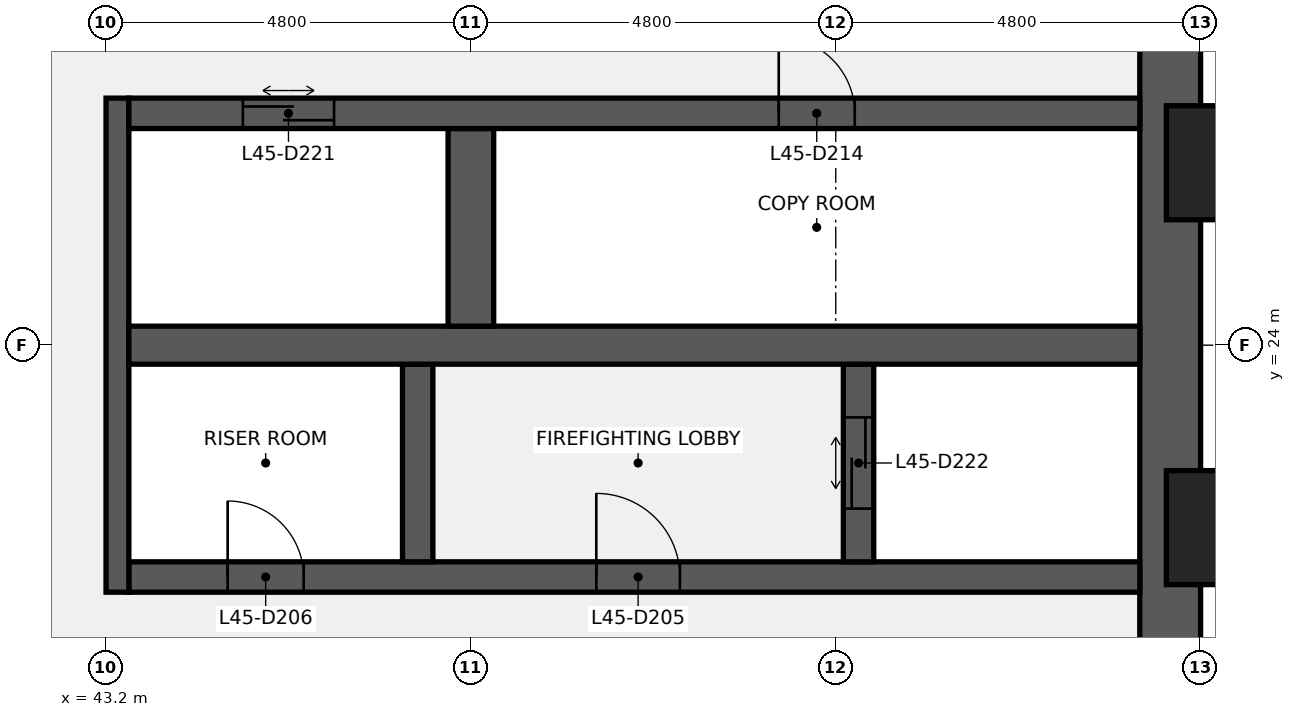
"""IFC4 building model, lengths in metres.
Left out: names, types, materials, properties, quantities, classifications, styles, units other than length and angle.
Written with IfcOpenShell. Run it as: python <this file> out.ifc"""

import sys

from ifc_helpers import new_model, si_unit, direction, frame, frame_2d, origin, origin_2d, place, context, subcontext, project, spatial, rectangle, extrude, element, fill, save


model = new_model("IFC4")
c1 = context("Model", 3, precision=1e-05, world=origin(), true_north=direction((0.0, 1.0)))
c2 = subcontext(c1, "Body", "Model", "MODEL_VIEW")
j1 = project(units=[si_unit("LENGTHUNIT", "METRE"), si_unit("PLANEANGLEUNIT", "RADIAN")], contexts=[c1])
p1 = place(None, origin())
s1 = spatial("IfcSite", under=j1, at=p1, CompositionType="ELEMENT")
p2 = place(p1, origin())
s2 = spatial("IfcBuilding", under=s1, at=p2, CompositionType="ELEMENT")
p3 = place(p2, frame((0.0, 0.0, 209.2)))
s3 = spatial("IfcBuildingStorey", under=s2, at=p3, CompositionType="ELEMENT", Elevation=209.2)
p4 = place(p3, frame((57.2, 38.4, 0.0), z_axis=(0.0, 0.0, 1.0), x_axis=(0.0, -1.0, 0.0)))
e1 = element("IfcWall", 1, at=p4, inside=s3, PredefinedType="SHEAR", context=c2, shape_type="SweptSolid", body=[
    extrude(rectangle(XDim=28.8, YDim=0.8, at=frame_2d((14.4, 0.0))), origin(), (0.0, 0.0, 1.0), 3.84),
])
p5 = place(p4, frame((18.45, 0.0, 0.9)))
e2 = element("IfcOpeningElement", 2, at=p5, cuts=e1, PredefinedType="OPENING", context=c2, shape_type="SweptSolid", body=[
    extrude(rectangle(XDim=1.5, YDim=1.5, at=frame_2d((0.75, 0.75))), frame((0.0, 0.41, 0.0), z_axis=(0.0, -1.0, 0.0), x_axis=(1.0, 0.0, 0.0)), (0.0, 0.0, 1.0), 0.82),
])
p6 = place(p4, frame((8.85, 0.0, 0.9)))
e3 = element("IfcOpeningElement", 3, at=p6, cuts=e1, PredefinedType="OPENING", context=c2, shape_type="SweptSolid", body=[
    extrude(rectangle(XDim=1.5, YDim=1.5, at=frame_2d((0.75, 0.75))), frame((0.0, 0.41, 0.0), z_axis=(0.0, -1.0, 0.0), x_axis=(1.0, 0.0, 0.0)), (0.0, 0.0, 1.0), 0.82),
])
p7 = place(p3, frame((43.5, 20.95, 0.0), z_axis=(0.0, 0.0, 1.0), x_axis=(1.0, 0.0, 0.0)))
e4 = element("IfcWall", 4, at=p7, inside=s3, PredefinedType="SHEAR", context=c2, shape_type="SweptSolid", body=[
    extrude(rectangle(XDim=13.3, YDim=0.4, at=frame_2d((6.65, 0.0))), origin(), (0.0, 0.0, 1.0), 3.84),
])
p8 = place(p7, frame((6.15, 0.0, 0.0)))
e5 = element("IfcOpeningElement", 5, at=p8, cuts=e4, PredefinedType="OPENING", context=c2, shape_type="SweptSolid", body=[
    extrude(rectangle(XDim=1.1, YDim=2.1, at=frame_2d((0.55, 1.05))), frame((0.0, 0.21, 0.0), z_axis=(0.0, -1.0, 0.0), x_axis=(1.0, 0.0, 0.0)), (0.0, 0.0, 1.0), 0.42),
])
p9 = place(p7, frame((1.3, 0.0, 0.0)))
e6 = element("IfcOpeningElement", 6, at=p9, cuts=e4, PredefinedType="OPENING", context=c2, shape_type="SweptSolid", body=[
    extrude(rectangle(XDim=1.0, YDim=2.1, at=frame_2d((0.5, 1.05))), frame((0.0, 0.21, 0.0), z_axis=(0.0, -1.0, 0.0), x_axis=(1.0, 0.0, 0.0)), (0.0, 0.0, 1.0), 0.42),
])
p10 = place(p3, frame((43.35, 20.75, 0.0), z_axis=(0.0, 0.0, 1.0), x_axis=(0.0, 1.0, 0.0)))
e7 = element("IfcWall", 7, at=p10, inside=s3, PredefinedType="SHEAR", context=c2, shape_type="SweptSolid", body=[
    extrude(rectangle(XDim=6.5, YDim=0.3, at=frame_2d((3.25, 0.0))), origin(), (0.0, 0.0, 1.0), 3.84),
])
p11 = place(p3, frame((53.1, 21.15, 0.0), z_axis=(0.0, 0.0, 1.0), x_axis=(0.0, 1.0, 0.0)))
e8 = element("IfcWall", 8, at=p11, inside=s3, PredefinedType="SHEAR", context=c2, shape_type="SweptSolid", body=[
    extrude(rectangle(XDim=2.6, YDim=0.4, at=frame_2d((1.3, 0.0))), origin(), (0.0, 0.0, 1.0), 3.84),
])
p12 = place(p11, frame((0.7, 0.0, 0.0)))
e9 = element("IfcOpeningElement", 9, at=p12, cuts=e8, PredefinedType="OPENING", context=c2, shape_type="SweptSolid", body=[
    extrude(rectangle(XDim=1.2, YDim=2.1, at=frame_2d((0.6, 1.05))), frame((0.0, 0.21, 0.0), z_axis=(0.0, -1.0, 0.0), x_axis=(1.0, 0.0, 0.0)), (0.0, 0.0, 1.0), 0.42),
])
p13 = place(p3, frame((47.3, 21.15, 0.0), z_axis=(0.0, 0.0, 1.0), x_axis=(0.0, 1.0, 0.0)))
e10 = element("IfcWall", 10, at=p13, inside=s3, PredefinedType="SHEAR", context=c2, shape_type="SweptSolid", body=[
    extrude(rectangle(XDim=2.6, YDim=0.4, at=frame_2d((1.3, 0.0))), origin(), (0.0, 0.0, 1.0), 3.84),
])
p14 = place(p3, frame((43.5, 24.0, 0.0), z_axis=(0.0, 0.0, 1.0), x_axis=(1.0, 0.0, 0.0)))
e11 = element("IfcWall", 11, at=p14, inside=s3, PredefinedType="SHEAR", context=c2, shape_type="SweptSolid", body=[
    extrude(rectangle(XDim=13.3, YDim=0.5, at=frame_2d((6.65, 0.0))), origin(), (0.0, 0.0, 1.0), 3.84),
])
p15 = place(p3, frame((48.0, 24.25, 0.0), z_axis=(0.0, 0.0, 1.0), x_axis=(0.0, 1.0, 0.0)))
e12 = element("IfcWall", 12, at=p15, inside=s3, PredefinedType="SHEAR", context=c2, shape_type="SweptSolid", body=[
    extrude(rectangle(XDim=2.6, YDim=0.6, at=frame_2d((1.3, 0.0))), origin(), (0.0, 0.0, 1.0), 3.84),
])
p16 = place(p3, frame((43.5, 27.05, 0.0), z_axis=(0.0, 0.0, 1.0), x_axis=(1.0, 0.0, 0.0)))
e13 = element("IfcWall", 13, at=p16, inside=s3, PredefinedType="SHEAR", context=c2, shape_type="SweptSolid", body=[
    extrude(rectangle(XDim=13.3, YDim=0.4, at=frame_2d((6.65, 0.0))), origin(), (0.0, 0.0, 1.0), 3.84),
])
p17 = place(p16, frame((8.55, 0.0, 0.0)))
e14 = element("IfcOpeningElement", 14, at=p17, cuts=e13, PredefinedType="OPENING", context=c2, shape_type="SweptSolid", body=[
    extrude(rectangle(XDim=1.0, YDim=2.1, at=frame_2d((0.5, 1.05))), frame((0.0, 0.21, 0.0), z_axis=(0.0, -1.0, 0.0), x_axis=(1.0, 0.0, 0.0)), (0.0, 0.0, 1.0), 0.42),
])
p18 = place(p16, frame((1.5, 0.0, 0.0)))
e15 = element("IfcOpeningElement", 15, at=p18, cuts=e13, PredefinedType="OPENING", context=c2, shape_type="SweptSolid", body=[
    extrude(rectangle(XDim=1.2, YDim=2.1, at=frame_2d((0.6, 1.05))), frame((0.0, 0.21, 0.0), z_axis=(0.0, -1.0, 0.0), x_axis=(1.0, 0.0, 0.0)), (0.0, 0.0, 1.0), 0.42),
])
for number, where, z_axis, x_axis in (
    (16, (58.35, 21.6, 0.0), (0.0, 0.0, 1.0), (0.0, 1.0, 0.0)),
    (17, (58.35, 26.4, 0.0), (0.0, 0.0, 1.0), (0.0, 1.0, 0.0)),
):
    element("IfcColumn", number, at=place(p3, frame(where, z_axis=z_axis, x_axis=x_axis)), inside=s3, PredefinedType="PILASTER", context=c2, shape_type="SweptSolid", body=[
        extrude(rectangle(XDim=2.4, YDim=1.5, at=origin_2d()), origin(), (0.0, 0.0, 1.0), 4.0),
    ])
p19 = place(p8, origin())
e18 = element("IfcDoor", 18, at=p19, inside=s3, OperationType="SINGLE_SWING_LEFT", PredefinedType="DOOR", context=c2, shape_type="SweptSolid", body=[
    extrude(rectangle(XDim=1.1, YDim=2.1, at=frame_2d((0.55, 1.05))), frame((0.0, 0.025, 0.0), z_axis=(0.0, -1.0, 0.0), x_axis=(1.0, 0.0, 0.0)), (0.0, 0.0, 1.0), 0.05),
])
fill(e5, e18)
p20 = place(p9, origin())
e19 = element("IfcDoor", 19, at=p20, inside=s3, OperationType="SINGLE_SWING_LEFT", PredefinedType="DOOR", context=c2, shape_type="SweptSolid", body=[
    extrude(rectangle(XDim=1.0, YDim=2.1, at=frame_2d((0.5, 1.05))), frame((0.0, 0.025, 0.0), z_axis=(0.0, -1.0, 0.0), x_axis=(1.0, 0.0, 0.0)), (0.0, 0.0, 1.0), 0.05),
])
fill(e6, e19)
p21 = place(p17, origin())
e20 = element("IfcDoor", 20, at=p21, inside=s3, OperationType="SINGLE_SWING_LEFT", PredefinedType="DOOR", context=c2, shape_type="SweptSolid", body=[
    extrude(rectangle(XDim=1.0, YDim=2.1, at=frame_2d((0.5, 1.05))), frame((0.0, 0.025, 0.0), z_axis=(0.0, -1.0, 0.0), x_axis=(1.0, 0.0, 0.0)), (0.0, 0.0, 1.0), 0.05),
])
fill(e14, e20)
p22 = place(p18, origin())
e21 = element("IfcDoor", 21, at=p22, inside=s3, OperationType="DOUBLE_DOOR_SLIDING", PredefinedType="DOOR", context=c2, shape_type="SweptSolid", body=[
    extrude(rectangle(XDim=1.2, YDim=2.1, at=frame_2d((0.6, 1.05))), frame((0.0, 0.025, 0.0), z_axis=(0.0, -1.0, 0.0), x_axis=(1.0, 0.0, 0.0)), (0.0, 0.0, 1.0), 0.05),
])
fill(e15, e21)
p23 = place(p12, origin())
e22 = element("IfcDoor", 22, at=p23, inside=s3, OperationType="DOUBLE_DOOR_SLIDING", PredefinedType="DOOR", context=c2, shape_type="SweptSolid", body=[
    extrude(rectangle(XDim=1.2, YDim=2.1, at=frame_2d((0.6, 1.05))), frame((0.0, 0.025, 0.0), z_axis=(0.0, -1.0, 0.0), x_axis=(1.0, 0.0, 0.0)), (0.0, 0.0, 1.0), 0.05),
])
fill(e9, e22)
save(model, sys.argv[1])
